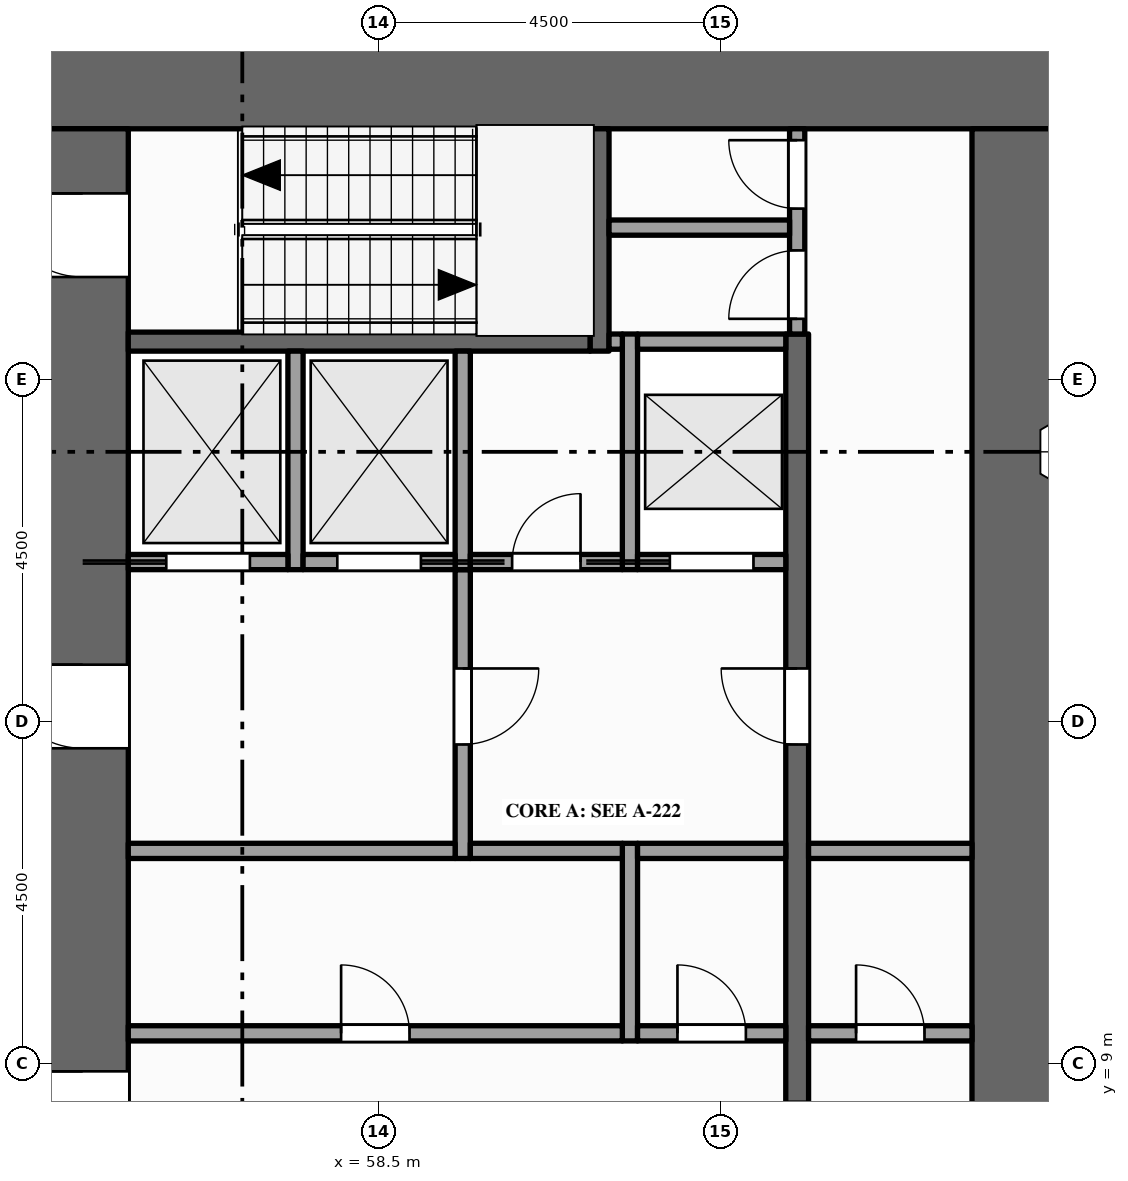
"""IFC4 building model, lengths in metres.
Left out: names, types, materials, properties, quantities, classifications, styles, units other than length and angle.
Written with IfcOpenShell. Run it as: python <this file> out.ifc"""

import sys

from ifc_helpers import new_model, si_unit, direction, frame, frame_2d, origin, place, context, subcontext, project, spatial, rectangle, extrude, element, fill, save


model = new_model("IFC4")
c1 = context("Model", 3, precision=1e-05, world=origin(), true_north=direction((0.0, 1.0)))
c2 = subcontext(c1, "Body", "Model", "MODEL_VIEW")
j1 = project(units=[si_unit("LENGTHUNIT", "METRE"), si_unit("PLANEANGLEUNIT", "RADIAN")], contexts=[c1])
p1 = place(None, origin())
s1 = spatial("IfcSite", under=j1, at=p1, CompositionType="ELEMENT")
p2 = place(p1, origin())
s2 = spatial("IfcBuilding", under=s1, at=p2, CompositionType="ELEMENT")
p3 = place(p2, frame((0.0, 0.0, 123.0)))
s3 = spatial("IfcBuildingStorey", under=s2, at=p3, CompositionType="ELEMENT", Elevation=123.0)
p4 = place(p3, frame((54.0, 21.9, -0.15), z_axis=(0.0, 0.0, 1.0), x_axis=(1.0, 0.0, 0.0)))
e1 = element("IfcWall", 1, at=p4, inside=s3, PredefinedType="SHEAR", context=c2, shape_type="SweptSolid", body=[
    extrude(rectangle(XDim=13.5, YDim=1.2, at=frame_2d((6.75, 0.0))), origin(), (0.0, 0.0, 1.0), 4.0),
])
p5 = place(p3, frame((54.6, 1.2, -0.15), z_axis=(0.0, 0.0, 1.0), x_axis=(0.0, 1.0, 0.0)))
e2 = element("IfcWall", 2, at=p5, inside=s3, PredefinedType="SHEAR", context=c2, shape_type="SweptSolid", body=[
    extrude(rectangle(XDim=20.1, YDim=1.2, at=frame_2d((10.05, 0.0))), origin(), (0.0, 0.0, 1.0), 4.0),
])
p6 = place(p5, frame((5.9, 0.0, 0.15)))
e3 = element("IfcOpeningElement", 3, at=p6, cuts=e2, PredefinedType="OPENING", context=c2, shape_type="SweptSolid", body=[
    extrude(rectangle(XDim=1.8, YDim=2.1, at=frame_2d((0.9, 1.05))), frame((0.0, 0.61, 0.0), z_axis=(0.0, -1.0, 0.0), x_axis=(1.0, 0.0, 0.0)), (0.0, 0.0, 1.0), 1.22),
])
p7 = place(p5, frame((11.95, 0.0, 0.15)))
e4 = element("IfcOpeningElement", 4, at=p7, cuts=e2, PredefinedType="OPENING", context=c2, shape_type="SweptSolid", body=[
    extrude(rectangle(XDim=1.1, YDim=2.1, at=frame_2d((0.55, 1.05))), frame((0.0, 0.61, 0.0), z_axis=(0.0, -1.0, 0.0), x_axis=(1.0, 0.0, 0.0)), (0.0, 0.0, 1.0), 1.22),
])
p8 = place(p5, frame((0.95, 0.0, 0.15)))
e5 = element("IfcOpeningElement", 5, at=p8, cuts=e2, PredefinedType="OPENING", context=c2, shape_type="SweptSolid", body=[
    extrude(rectangle(XDim=1.1, YDim=2.1, at=frame_2d((0.55, 1.05))), frame((0.0, 0.61, 0.0), z_axis=(0.0, -1.0, 0.0), x_axis=(1.0, 0.0, 0.0)), (0.0, 0.0, 1.0), 1.22),
])
p9 = place(p5, frame((18.15, 0.0, 0.15)))
e6 = element("IfcOpeningElement", 6, at=p9, cuts=e2, PredefinedType="OPENING", context=c2, shape_type="SweptSolid", body=[
    extrude(rectangle(XDim=1.1, YDim=2.1, at=frame_2d((0.55, 1.05))), frame((0.0, 0.61, 0.0), z_axis=(0.0, -1.0, 0.0), x_axis=(1.0, 0.0, 0.0)), (0.0, 0.0, 1.0), 1.22),
])
p10 = place(p3, frame((66.9, 1.2, -0.15), z_axis=(0.0, 0.0, 1.0), x_axis=(0.0, 1.0, 0.0)))
e7 = element("IfcWall", 7, at=p10, inside=s3, PredefinedType="SHEAR", context=c2, shape_type="SweptSolid", body=[
    extrude(rectangle(XDim=20.1, YDim=1.2, at=frame_2d((10.05, 0.0))), origin(), (0.0, 0.0, 1.0), 4.0),
])
p11 = place(p3, frame((57.4, 15.5, 0.0), z_axis=(0.0, 0.0, 1.0), x_axis=(0.0, 1.0, 0.0)))
e8 = element("IfcWall", 8, at=p11, inside=s3, PredefinedType="SOLIDWALL", context=c2, shape_type="SweptSolid", body=[
    extrude(rectangle(XDim=2.875, YDim=0.2, at=frame_2d((1.438, 0.0))), origin(), (0.0, 0.0, 1.0), 3.85),
])
p12 = place(p3, frame((59.6, 11.7, 0.0), z_axis=(0.0, 0.0, 1.0), x_axis=(0.0, 1.0, 0.0)))
e9 = element("IfcWall", 9, at=p12, inside=s3, PredefinedType="PARTITIONING", context=c2, shape_type="SweptSolid", body=[
    extrude(rectangle(XDim=3.8, YDim=0.2, at=frame_2d((1.9, 0.0))), origin(), (0.0, 0.0, 1.0), 3.85),
])
p13 = place(p12, frame((1.5, 0.0, 0.0)))
e10 = element("IfcOpeningElement", 10, at=p13, cuts=e9, PredefinedType="OPENING", context=c2, shape_type="SweptSolid", body=[
    extrude(rectangle(XDim=1.0, YDim=2.1, at=frame_2d((0.5, 1.05))), frame((0.0, 0.11, 0.0), z_axis=(0.0, -1.0, 0.0), x_axis=(1.0, 0.0, 0.0)), (0.0, 0.0, 1.0), 0.22),
])
p14 = place(p3, frame((59.6, 15.5, 0.0), z_axis=(0.0, 0.0, 1.0), x_axis=(0.0, 1.0, 0.0)))
e11 = element("IfcWall", 11, at=p14, inside=s3, PredefinedType="SOLIDWALL", context=c2, shape_type="SweptSolid", body=[
    extrude(rectangle(XDim=2.875, YDim=0.2, at=frame_2d((1.438, 0.0))), origin(), (0.0, 0.0, 1.0), 3.85),
])
p15 = place(p3, frame((61.4, 18.375, 0.0), z_axis=(0.0, 0.0, 1.0), x_axis=(0.0, 1.0, 0.0)))
e12 = element("IfcWall", 12, at=p15, inside=s3, PredefinedType="SHEAR", context=c2, shape_type="SweptSolid", body=[
    extrude(rectangle(XDim=2.925, YDim=0.25, at=frame_2d((1.462, 0.0))), origin(), (0.0, 0.0, 1.0), 3.85),
])
p16 = place(p3, frame((61.8, 9.3, 0.0), z_axis=(0.0, 0.0, 1.0), x_axis=(0.0, 1.0, 0.0)))
e13 = element("IfcWall", 13, at=p16, inside=s3, PredefinedType="PARTITIONING", context=c2, shape_type="SweptSolid", body=[
    extrude(rectangle(XDim=2.6, YDim=0.2, at=frame_2d((1.3, 0.0))), origin(), (0.0, 0.0, 1.0), 3.85),
])
p17 = place(p3, frame((61.8, 15.5, 0.0), z_axis=(0.0, 0.0, 1.0), x_axis=(0.0, 1.0, 0.0)))
e14 = element("IfcWall", 14, at=p17, inside=s3, PredefinedType="SOLIDWALL", context=c2, shape_type="SweptSolid", body=[
    extrude(rectangle(XDim=3.1, YDim=0.2, at=frame_2d((1.55, 0.0))), origin(), (0.0, 0.0, 1.0), 3.85),
])
p18 = place(p3, frame((64.0, 4.1, 0.0), z_axis=(0.0, 0.0, 1.0), x_axis=(0.0, 1.0, 0.0)))
e15 = element("IfcWall", 15, at=p18, inside=s3, PredefinedType="SHEAR", context=c2, shape_type="SweptSolid", body=[
    extrude(rectangle(XDim=14.5, YDim=0.3, at=frame_2d((7.25, 0.0))), origin(), (0.0, 0.0, 1.0), 3.85),
])
p19 = place(p18, frame((3.4, 0.0, 0.0)))
e16 = element("IfcOpeningElement", 16, at=p19, cuts=e15, PredefinedType="OPENING", context=c2, shape_type="SweptSolid", body=[
    extrude(rectangle(XDim=1.0, YDim=2.1, at=frame_2d((0.5, 1.05))), frame((0.0, 0.16, 0.0), z_axis=(0.0, -1.0, 0.0), x_axis=(1.0, 0.0, 0.0)), (0.0, 0.0, 1.0), 0.32),
])
p20 = place(p18, frame((9.1, 0.0, 0.0)))
e17 = element("IfcOpeningElement", 17, at=p20, cuts=e15, PredefinedType="OPENING", context=c2, shape_type="SweptSolid", body=[
    extrude(rectangle(XDim=1.0, YDim=2.1, at=frame_2d((0.5, 1.05))), frame((0.0, 0.16, 0.0), z_axis=(0.0, -1.0, 0.0), x_axis=(1.0, 0.0, 0.0)), (0.0, 0.0, 1.0), 0.32),
])
p21 = place(p3, frame((64.0, 18.6, 0.0), z_axis=(0.0, 0.0, 1.0), x_axis=(0.0, 1.0, 0.0)))
e18 = element("IfcWall", 18, at=p21, inside=s3, PredefinedType="PARTITIONING", context=c2, shape_type="SweptSolid", body=[
    extrude(rectangle(XDim=2.7, YDim=0.2, at=frame_2d((1.35, 0.0))), origin(), (0.0, 0.0, 1.0), 3.85),
])
p22 = place(p21, frame((0.2, 0.0, 0.0)))
e19 = element("IfcOpeningElement", 19, at=p22, cuts=e18, PredefinedType="OPENING", context=c2, shape_type="SweptSolid", body=[
    extrude(rectangle(XDim=0.9, YDim=2.1, at=frame_2d((0.45, 1.05))), frame((0.0, 0.11, 0.0), z_axis=(0.0, -1.0, 0.0), x_axis=(1.0, 0.0, 0.0)), (0.0, 0.0, 1.0), 0.22),
])
p23 = place(p21, frame((1.65, 0.0, 0.0)))
e20 = element("IfcOpeningElement", 20, at=p23, cuts=e18, PredefinedType="OPENING", context=c2, shape_type="SweptSolid", body=[
    extrude(rectangle(XDim=0.9, YDim=2.1, at=frame_2d((0.45, 1.05))), frame((0.0, 0.11, 0.0), z_axis=(0.0, -1.0, 0.0), x_axis=(1.0, 0.0, 0.0)), (0.0, 0.0, 1.0), 0.22),
])
p24 = place(p3, frame((55.2, 9.4, 0.0), z_axis=(0.0, 0.0, 1.0), x_axis=(1.0, 0.0, 0.0)))
e21 = element("IfcWall", 21, at=p24, inside=s3, PredefinedType="PARTITIONING", context=c2, shape_type="SweptSolid", body=[
    extrude(rectangle(XDim=6.5, YDim=0.2, at=frame_2d((3.25, 0.0))), origin(), (0.0, 0.0, 1.0), 3.85),
])
p25 = place(p24, frame((2.8, 0.0, 0.0)))
e22 = element("IfcOpeningElement", 22, at=p25, cuts=e21, PredefinedType="OPENING", context=c2, shape_type="SweptSolid", body=[
    extrude(rectangle(XDim=0.9, YDim=2.1, at=frame_2d((0.45, 1.05))), frame((0.0, 0.11, 0.0), z_axis=(0.0, -1.0, 0.0), x_axis=(1.0, 0.0, 0.0)), (0.0, 0.0, 1.0), 0.22),
])
p26 = place(p3, frame((61.9, 9.4, 0.0), z_axis=(0.0, 0.0, 1.0), x_axis=(1.0, 0.0, 0.0)))
e23 = element("IfcWall", 23, at=p26, inside=s3, PredefinedType="PARTITIONING", context=c2, shape_type="SweptSolid", body=[
    extrude(rectangle(XDim=1.95, YDim=0.2, at=frame_2d((0.975, 0.0))), origin(), (0.0, 0.0, 1.0), 3.85),
])
p27 = place(p26, frame((0.525, 0.0, 0.0)))
e24 = element("IfcOpeningElement", 24, at=p27, cuts=e23, PredefinedType="OPENING", context=c2, shape_type="SweptSolid", body=[
    extrude(rectangle(XDim=0.9, YDim=2.1, at=frame_2d((0.45, 1.05))), frame((0.0, 0.11, 0.0), z_axis=(0.0, -1.0, 0.0), x_axis=(1.0, 0.0, 0.0)), (0.0, 0.0, 1.0), 0.22),
])
p28 = place(p3, frame((64.15, 9.4, 0.0), z_axis=(0.0, 0.0, 1.0), x_axis=(1.0, 0.0, 0.0)))
e25 = element("IfcWall", 25, at=p28, inside=s3, PredefinedType="PARTITIONING", context=c2, shape_type="SweptSolid", body=[
    extrude(rectangle(XDim=2.15, YDim=0.2, at=frame_2d((1.075, 0.0))), origin(), (0.0, 0.0, 1.0), 3.85),
])
p29 = place(p28, frame((0.625, 0.0, 0.0)))
e26 = element("IfcOpeningElement", 26, at=p29, cuts=e25, PredefinedType="OPENING", context=c2, shape_type="SweptSolid", body=[
    extrude(rectangle(XDim=0.9, YDim=2.1, at=frame_2d((0.45, 1.05))), frame((0.0, 0.11, 0.0), z_axis=(0.0, -1.0, 0.0), x_axis=(1.0, 0.0, 0.0)), (0.0, 0.0, 1.0), 0.22),
])
p30 = place(p3, frame((55.2, 11.8, 0.0), z_axis=(0.0, 0.0, 1.0), x_axis=(1.0, 0.0, 0.0)))
e27 = element("IfcWall", 27, at=p30, inside=s3, PredefinedType="PARTITIONING", context=c2, shape_type="SweptSolid", body=[
    extrude(rectangle(XDim=4.3, YDim=0.2, at=frame_2d((2.15, 0.0))), origin(), (0.0, 0.0, 1.0), 3.85),
])
p31 = place(p3, frame((59.7, 11.8, 0.0), z_axis=(0.0, 0.0, 1.0), x_axis=(1.0, 0.0, 0.0)))
e28 = element("IfcWall", 28, at=p31, inside=s3, PredefinedType="PARTITIONING", context=c2, shape_type="SweptSolid", body=[
    extrude(rectangle(XDim=2.0, YDim=0.2, at=frame_2d((1.0, 0.0))), origin(), (0.0, 0.0, 1.0), 3.85),
])
p32 = place(p3, frame((61.9, 11.8, 0.0), z_axis=(0.0, 0.0, 1.0), x_axis=(1.0, 0.0, 0.0)))
e29 = element("IfcWall", 29, at=p32, inside=s3, PredefinedType="PARTITIONING", context=c2, shape_type="SweptSolid", body=[
    extrude(rectangle(XDim=1.95, YDim=0.2, at=frame_2d((0.975, 0.0))), origin(), (0.0, 0.0, 1.0), 3.85),
])
p33 = place(p3, frame((64.15, 11.8, 0.0), z_axis=(0.0, 0.0, 1.0), x_axis=(1.0, 0.0, 0.0)))
e30 = element("IfcWall", 30, at=p33, inside=s3, PredefinedType="PARTITIONING", context=c2, shape_type="SweptSolid", body=[
    extrude(rectangle(XDim=2.15, YDim=0.2, at=frame_2d((1.075, 0.0))), origin(), (0.0, 0.0, 1.0), 3.85),
])
p34 = place(p3, frame((55.2, 15.6, 0.0), z_axis=(0.0, 0.0, 1.0), x_axis=(1.0, 0.0, 0.0)))
e31 = element("IfcWall", 31, at=p34, inside=s3, PredefinedType="SOLIDWALL", context=c2, shape_type="SweptSolid", body=[
    extrude(rectangle(XDim=2.1, YDim=0.2, at=frame_2d((1.05, 0.0))), origin(), (0.0, 0.0, 1.0), 3.85),
])
p35 = place(p34, frame((0.5, 0.0, 0.012)))
e32 = element("IfcOpeningElement", 32, at=p35, cuts=e31, PredefinedType="OPENING", context=c2, shape_type="SweptSolid", body=[
    extrude(rectangle(XDim=1.1, YDim=2.1, at=frame_2d((0.55, 1.05))), frame((0.0, 0.11, 0.0), z_axis=(0.0, -1.0, 0.0), x_axis=(1.0, 0.0, 0.0)), (0.0, 0.0, 1.0), 0.22),
])
p36 = place(p3, frame((57.5, 15.6, 0.0), z_axis=(0.0, 0.0, 1.0), x_axis=(1.0, 0.0, 0.0)))
e33 = element("IfcWall", 33, at=p36, inside=s3, PredefinedType="SOLIDWALL", context=c2, shape_type="SweptSolid", body=[
    extrude(rectangle(XDim=2.0, YDim=0.2, at=frame_2d((1.0, 0.0))), origin(), (0.0, 0.0, 1.0), 3.85),
])
p37 = place(p36, frame((0.45, 0.0, 0.012)))
e34 = element("IfcOpeningElement", 34, at=p37, cuts=e33, PredefinedType="OPENING", context=c2, shape_type="SweptSolid", body=[
    extrude(rectangle(XDim=1.1, YDim=2.1, at=frame_2d((0.55, 1.05))), frame((0.0, 0.11, 0.0), z_axis=(0.0, -1.0, 0.0), x_axis=(1.0, 0.0, 0.0)), (0.0, 0.0, 1.0), 0.22),
])
p38 = place(p3, frame((59.7, 15.6, 0.0), z_axis=(0.0, 0.0, 1.0), x_axis=(1.0, 0.0, 0.0)))
e35 = element("IfcWall", 35, at=p38, inside=s3, PredefinedType="PARTITIONING", context=c2, shape_type="SweptSolid", body=[
    extrude(rectangle(XDim=2.0, YDim=0.2, at=frame_2d((1.0, 0.0))), origin(), (0.0, 0.0, 1.0), 3.85),
])
p39 = place(p38, frame((0.55, 0.0, 0.0)))
e36 = element("IfcOpeningElement", 36, at=p39, cuts=e35, PredefinedType="OPENING", context=c2, shape_type="SweptSolid", body=[
    extrude(rectangle(XDim=0.9, YDim=2.1, at=frame_2d((0.45, 1.05))), frame((0.0, 0.11, 0.0), z_axis=(0.0, -1.0, 0.0), x_axis=(1.0, 0.0, 0.0)), (0.0, 0.0, 1.0), 0.22),
])
p40 = place(p3, frame((61.9, 15.6, 0.0), z_axis=(0.0, 0.0, 1.0), x_axis=(1.0, 0.0, 0.0)))
e37 = element("IfcWall", 37, at=p40, inside=s3, PredefinedType="SOLIDWALL", context=c2, shape_type="SweptSolid", body=[
    extrude(rectangle(XDim=1.95, YDim=0.2, at=frame_2d((0.975, 0.0))), origin(), (0.0, 0.0, 1.0), 3.85),
])
p41 = place(p40, frame((0.425, 0.0, 0.012)))
e38 = element("IfcOpeningElement", 38, at=p41, cuts=e37, PredefinedType="OPENING", context=c2, shape_type="SweptSolid", body=[
    extrude(rectangle(XDim=1.1, YDim=2.1, at=frame_2d((0.55, 1.05))), frame((0.0, 0.11, 0.0), z_axis=(0.0, -1.0, 0.0), x_axis=(1.0, 0.0, 0.0)), (0.0, 0.0, 1.0), 0.22),
])
p42 = place(p3, frame((55.2, 18.5, 0.0), z_axis=(0.0, 0.0, 1.0), x_axis=(1.0, 0.0, 0.0)))
e39 = element("IfcWall", 39, at=p42, inside=s3, PredefinedType="SHEAR", context=c2, shape_type="SweptSolid", body=[
    extrude(rectangle(XDim=6.075, YDim=0.25, at=frame_2d((3.038, 0.0))), origin(), (0.0, 0.0, 1.0), 3.85),
])
p43 = place(p3, frame((61.525, 18.5, 0.0), z_axis=(0.0, 0.0, 1.0), x_axis=(1.0, 0.0, 0.0)))
e40 = element("IfcWall", 40, at=p43, inside=s3, PredefinedType="PARTITIONING", context=c2, shape_type="SweptSolid", body=[
    extrude(rectangle(XDim=0.175, YDim=0.2, at=frame_2d((0.087, 0.0))), origin(), (0.0, 0.0, 1.0), 3.85),
])
p44 = place(p3, frame((61.9, 18.5, 0.0), z_axis=(0.0, 0.0, 1.0), x_axis=(1.0, 0.0, 0.0)))
e41 = element("IfcWall", 41, at=p44, inside=s3, PredefinedType="SOLIDWALL", context=c2, shape_type="SweptSolid", body=[
    extrude(rectangle(XDim=1.95, YDim=0.2, at=frame_2d((0.975, 0.0))), origin(), (0.0, 0.0, 1.0), 3.85),
])
p45 = place(p3, frame((61.525, 20.0, 0.0), z_axis=(0.0, 0.0, 1.0), x_axis=(1.0, 0.0, 0.0)))
e42 = element("IfcWall", 42, at=p45, inside=s3, PredefinedType="PARTITIONING", context=c2, shape_type="SweptSolid", body=[
    extrude(rectangle(XDim=2.375, YDim=0.2, at=frame_2d((1.188, 0.0))), origin(), (0.0, 0.0, 1.0), 3.85),
])
p46 = place(p35, origin())
e43 = element("IfcDoor", 43, at=p46, inside=s3, OperationType="SLIDING_TO_LEFT", PredefinedType="DOOR", context=c2, shape_type="SweptSolid", body=[
    extrude(rectangle(XDim=1.1, YDim=2.1, at=frame_2d((0.55, 1.05))), frame((0.0, 0.025, 0.0), z_axis=(0.0, -1.0, 0.0), x_axis=(1.0, 0.0, 0.0)), (0.0, 0.0, 1.0), 0.05),
])
fill(e32, e43)
p47 = place(p37, origin())
e44 = element("IfcDoor", 44, at=p47, inside=s3, OperationType="SLIDING_TO_RIGHT", PredefinedType="DOOR", context=c2, shape_type="SweptSolid", body=[
    extrude(rectangle(XDim=1.1, YDim=2.1, at=frame_2d((0.55, 1.05))), frame((0.0, 0.025, 0.0), z_axis=(0.0, -1.0, 0.0), x_axis=(1.0, 0.0, 0.0)), (0.0, 0.0, 1.0), 0.05),
])
fill(e34, e44)
p48 = place(p41, origin())
e45 = element("IfcDoor", 45, at=p48, inside=s3, OperationType="SLIDING_TO_LEFT", PredefinedType="DOOR", context=c2, shape_type="SweptSolid", body=[
    extrude(rectangle(XDim=1.1, YDim=2.1, at=frame_2d((0.55, 1.05))), frame((0.0, 0.025, 0.0), z_axis=(0.0, -1.0, 0.0), x_axis=(1.0, 0.0, 0.0)), (0.0, 0.0, 1.0), 0.05),
])
fill(e38, e45)
p49 = place(p6, origin())
e46 = element("IfcDoor", 46, at=p49, inside=s3, OperationType="DOUBLE_DOOR_SINGLE_SWING", PredefinedType="DOOR", context=c2, shape_type="SweptSolid", body=[
    extrude(rectangle(XDim=1.8, YDim=2.1, at=frame_2d((0.9, 1.05))), frame((0.0, 0.025, 0.0), z_axis=(0.0, -1.0, 0.0), x_axis=(1.0, 0.0, 0.0)), (0.0, 0.0, 1.0), 0.05),
])
fill(e3, e46)
p50 = place(p7, origin())
e47 = element("IfcDoor", 47, at=p50, inside=s3, OperationType="SINGLE_SWING_RIGHT", PredefinedType="DOOR", context=c2, shape_type="SweptSolid", body=[
    extrude(rectangle(XDim=1.1, YDim=2.1, at=frame_2d((0.55, 1.05))), frame((0.0, 0.025, 0.0), z_axis=(0.0, -1.0, 0.0), x_axis=(1.0, 0.0, 0.0)), (0.0, 0.0, 1.0), 0.05),
])
fill(e4, e47)
p51 = place(p13, origin())
e48 = element("IfcDoor", 48, at=p51, inside=s3, OperationType="SINGLE_SWING_RIGHT", PredefinedType="DOOR", context=c2, shape_type="SweptSolid", body=[
    extrude(rectangle(XDim=1.0, YDim=2.1, at=frame_2d((0.5, 1.05))), frame((0.0, 0.025, 0.0), z_axis=(0.0, -1.0, 0.0), x_axis=(1.0, 0.0, 0.0)), (0.0, 0.0, 1.0), 0.05),
])
fill(e10, e48)
p52 = place(p20, origin())
e49 = element("IfcDoor", 49, at=p52, inside=s3, OperationType="SINGLE_SWING_RIGHT", PredefinedType="DOOR", context=c2, shape_type="SweptSolid", body=[
    extrude(rectangle(XDim=1.0, YDim=2.1, at=frame_2d((0.5, 1.05))), frame((0.0, 0.025, 0.0), z_axis=(0.0, -1.0, 0.0), x_axis=(1.0, 0.0, 0.0)), (0.0, 0.0, 1.0), 0.05),
])
fill(e17, e49)
p53 = place(p29, origin())
e50 = element("IfcDoor", 50, at=p53, inside=s3, OperationType="SINGLE_SWING_LEFT", PredefinedType="DOOR", context=c2, shape_type="SweptSolid", body=[
    extrude(rectangle(XDim=0.9, YDim=2.1, at=frame_2d((0.45, 1.05))), frame((0.0, 0.025, 0.0), z_axis=(0.0, -1.0, 0.0), x_axis=(1.0, 0.0, 0.0)), (0.0, 0.0, 1.0), 0.05),
])
fill(e26, e50)
p54 = place(p9, origin())
e51 = element("IfcDoor", 51, at=p54, inside=s3, OperationType="SINGLE_SWING_RIGHT", PredefinedType="DOOR", context=c2, shape_type="SweptSolid", body=[
    extrude(rectangle(XDim=1.1, YDim=2.1, at=frame_2d((0.55, 1.05))), frame((0.0, 0.025, 0.0), z_axis=(0.0, -1.0, 0.0), x_axis=(1.0, 0.0, 0.0)), (0.0, 0.0, 1.0), 0.05),
])
fill(e6, e51)
p55 = place(p22, origin())
e52 = element("IfcDoor", 52, at=p55, inside=s3, OperationType="SINGLE_SWING_LEFT", PredefinedType="DOOR", context=c2, shape_type="SweptSolid", body=[
    extrude(rectangle(XDim=0.9, YDim=2.1, at=frame_2d((0.45, 1.05))), frame((0.0, 0.025, 0.0), z_axis=(0.0, -1.0, 0.0), x_axis=(1.0, 0.0, 0.0)), (0.0, 0.0, 1.0), 0.05),
])
fill(e19, e52)
p56 = place(p23, origin())
e53 = element("IfcDoor", 53, at=p56, inside=s3, OperationType="SINGLE_SWING_RIGHT", PredefinedType="DOOR", context=c2, shape_type="SweptSolid", body=[
    extrude(rectangle(XDim=0.9, YDim=2.1, at=frame_2d((0.45, 1.05))), frame((0.0, 0.025, 0.0), z_axis=(0.0, -1.0, 0.0), x_axis=(1.0, 0.0, 0.0)), (0.0, 0.0, 1.0), 0.05),
])
fill(e20, e53)
p57 = place(p25, origin())
e54 = element("IfcDoor", 54, at=p57, inside=s3, OperationType="SINGLE_SWING_LEFT", PredefinedType="DOOR", context=c2, shape_type="SweptSolid", body=[
    extrude(rectangle(XDim=0.9, YDim=2.1, at=frame_2d((0.45, 1.05))), frame((0.0, 0.025, 0.0), z_axis=(0.0, -1.0, 0.0), x_axis=(1.0, 0.0, 0.0)), (0.0, 0.0, 1.0), 0.05),
])
fill(e22, e54)
p58 = place(p27, origin())
e55 = element("IfcDoor", 55, at=p58, inside=s3, OperationType="SINGLE_SWING_LEFT", PredefinedType="DOOR", context=c2, shape_type="SweptSolid", body=[
    extrude(rectangle(XDim=0.9, YDim=2.1, at=frame_2d((0.45, 1.05))), frame((0.0, 0.025, 0.0), z_axis=(0.0, -1.0, 0.0), x_axis=(1.0, 0.0, 0.0)), (0.0, 0.0, 1.0), 0.05),
])
fill(e24, e55)
p59 = place(p39, origin())
e56 = element("IfcDoor", 56, at=p59, inside=s3, OperationType="SINGLE_SWING_RIGHT", PredefinedType="DOOR", context=c2, shape_type="SweptSolid", body=[
    extrude(rectangle(XDim=0.9, YDim=2.1, at=frame_2d((0.45, 1.05))), frame((0.0, 0.025, 0.0), z_axis=(0.0, -1.0, 0.0), x_axis=(1.0, 0.0, 0.0)), (0.0, 0.0, 1.0), 0.05),
])
fill(e36, e56)
save(model, sys.argv[1])
